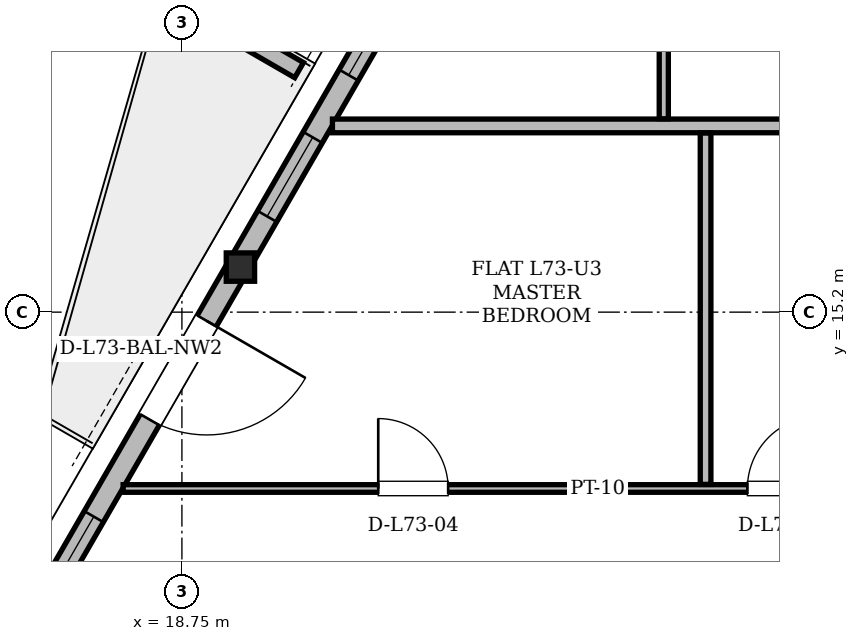
"""IFC4 building model, lengths in metres.
Left out: names, types, materials, properties, quantities, classifications, styles, units other than length and angle.
Written with IfcOpenShell. Run it as: python <this file> out.ifc"""

import sys

from ifc_helpers import new_model, si_unit, direction, frame, frame_2d, origin, origin_2d, place, context, subcontext, project, spatial, polyline, rectangle, i_section, outline, extrude, element, fill, save


model = new_model("IFC4")
c1 = context("Model", 3, precision=1e-05, world=origin(), true_north=direction((0.0, 1.0)))
c2 = subcontext(c1, "Body", "Model", "MODEL_VIEW")
j1 = project(units=[si_unit("LENGTHUNIT", "METRE"), si_unit("PLANEANGLEUNIT", "RADIAN")], contexts=[c1])
p1 = place(None, origin())
s1 = spatial("IfcSite", under=j1, at=p1, CompositionType="ELEMENT")
p2 = place(p1, origin())
s2 = spatial("IfcBuilding", under=s1, at=p2, CompositionType="ELEMENT")
p3 = place(p2, frame((0.0, 0.0, 277.2)))
s3 = spatial("IfcBuildingStorey", under=s2, at=p3, CompositionType="ELEMENT", Elevation=277.2)
p4 = place(p3, frame((19.499, 15.814, 0.005), z_axis=(0.01097941287, -0.01097941287, 0.999879445226), x_axis=(0.707106781187, 0.707106781187, 0.0)))
e1 = element("IfcColumn", 1, at=p4, inside=s3, PredefinedType="COLUMN", context=c2, shape_type="SweptSolid", body=[
    extrude(i_section(OverallWidth=0.373, OverallDepth=0.373, WebThickness=0.016, FlangeThickness=0.026, at=origin_2d()), origin(), (0.0, 0.0, 1.0), 3.891),
])
p5 = place(p3, frame((35.202, 43.013, 0.0), z_axis=(0.0, 0.0, 1.0), x_axis=(-0.499998095684, -0.866026503239, 0.0)))
e2 = element("IfcWall", 2, at=p5, inside=s3, PredefinedType="SOLIDWALL", context=c2, shape_type="SweptSolid", body=[
    extrude(rectangle(XDim=37.389, YDim=0.29, at=frame_2d((18.695, 0.0))), origin(), (0.0, 0.0, 1.0), 3.058),
])
p6 = place(p5, frame((8.034, 0.0, 0.0)))
e3 = element("IfcOpeningElement", 3, at=p6, cuts=e2, PredefinedType="OPENING", context=c2, shape_type="SweptSolid", body=[
    extrude(rectangle(XDim=1.5, YDim=2.2, at=frame_2d((0.75, 1.1))), frame((0.0, 0.145, 0.0), z_axis=(0.0, -1.0, 0.0), x_axis=(1.0, 0.0, 0.0)), (0.0, 0.0, 1.0), 0.29),
])
p7 = place(p5, frame((32.25, 0.0, 0.0)))
e4 = element("IfcOpeningElement", 4, at=p7, cuts=e2, PredefinedType="OPENING", context=c2, shape_type="SweptSolid", body=[
    extrude(rectangle(XDim=1.5, YDim=2.2, at=frame_2d((0.75, 1.1))), frame((0.0, 0.145, 0.0), z_axis=(0.0, -1.0, 0.0), x_axis=(1.0, 0.0, 0.0)), (0.0, 0.0, 1.0), 0.29),
])
p8 = place(p5, frame((35.223, 0.0, 0.85)))
e5 = element("IfcOpeningElement", 5, at=p8, cuts=e2, PredefinedType="OPENING", context=c2, shape_type="SweptSolid", body=[
    extrude(rectangle(XDim=1.2, YDim=1.48, at=frame_2d((0.6, 0.74))), frame((0.0, 0.145, 0.0), z_axis=(0.0, -1.0, 0.0), x_axis=(1.0, 0.0, 0.0)), (0.0, 0.0, 1.0), 0.29),
])
p9 = place(p5, frame((29.461, 0.0, 0.85)))
e6 = element("IfcOpeningElement", 6, at=p9, cuts=e2, PredefinedType="OPENING", context=c2, shape_type="SweptSolid", body=[
    extrude(rectangle(XDim=1.2, YDim=1.48, at=frame_2d((0.6, 0.74))), frame((0.0, 0.145, 0.0), z_axis=(0.0, -1.0, 0.0), x_axis=(1.0, 0.0, 0.0)), (0.0, 0.0, 1.0), 0.29),
])
p10 = place(p5, frame((20.271, 0.0, 0.85)))
e7 = element("IfcOpeningElement", 7, at=p10, cuts=e2, PredefinedType="OPENING", context=c2, shape_type="SweptSolid", body=[
    extrude(rectangle(XDim=1.2, YDim=1.48, at=frame_2d((0.6, 0.74))), frame((0.0, 0.145, 0.0), z_axis=(0.0, -1.0, 0.0), x_axis=(1.0, 0.0, 0.0)), (0.0, 0.0, 1.0), 0.29),
])
p11 = place(p5, frame((22.555, 0.0, 0.85)))
e8 = element("IfcOpeningElement", 8, at=p11, cuts=e2, PredefinedType="OPENING", context=c2, shape_type="SweptSolid", body=[
    extrude(rectangle(XDim=1.2, YDim=1.48, at=frame_2d((0.6, 0.74))), frame((0.0, 0.145, 0.0), z_axis=(0.0, -1.0, 0.0), x_axis=(1.0, 0.0, 0.0)), (0.0, 0.0, 1.0), 0.29),
])
p12 = place(p5, frame((27.315, 0.0, 0.85)))
e9 = element("IfcOpeningElement", 9, at=p12, cuts=e2, PredefinedType="OPENING", context=c2, shape_type="SweptSolid", body=[
    extrude(rectangle(XDim=1.2, YDim=1.48, at=frame_2d((0.6, 0.74))), frame((0.0, 0.145, 0.0), z_axis=(0.0, -1.0, 0.0), x_axis=(1.0, 0.0, 0.0)), (0.0, 0.0, 1.0), 0.29),
])
p13 = place(p5, frame((3.242, 0.0, 0.85)))
e10 = element("IfcOpeningElement", 10, at=p13, cuts=e2, PredefinedType="OPENING", context=c2, shape_type="SweptSolid", body=[
    extrude(rectangle(XDim=1.2, YDim=1.48, at=frame_2d((0.6, 0.74))), frame((0.0, 0.145, 0.0), z_axis=(0.0, -1.0, 0.0), x_axis=(1.0, 0.0, 0.0)), (0.0, 0.0, 1.0), 0.29),
])
p14 = place(p3, frame((20.292, 18.384, 0.0), z_axis=(0.0, 0.0, 1.0), x_axis=(-0.866042246008, 0.499970827278, 0.0)))
e11 = element("IfcWall", 11, at=p14, inside=s3, PredefinedType="PARAPET", context=c2, shape_type="SweptSolid", body=[
    extrude(outline(polyline([(0.0, 0.0), (2.042, 0.0), (2.042, 1.1), (0.0, 1.32), (0.0, 0.0)])), frame((0.0, 0.115, 0.0), z_axis=(0.0, -1.0, 0.0), x_axis=(1.0, 0.0, 0.0)), (0.0, 0.0, 1.0), 0.23),
])
p15 = place(p3, frame((17.977, 12.88, 0.0), z_axis=(0.0, 0.0, 1.0), x_axis=(1.0, 0.0, 0.0)))
e12 = element("IfcWall", 12, at=p15, inside=s3, PredefinedType="PARTITIONING", context=c2, shape_type="SweptSolid", body=[
    extrude(rectangle(XDim=11.609, YDim=0.1, at=frame_2d((5.805, 0.0))), origin(), (0.0, 0.0, 1.0), 2.82),
])
p16 = place(p15, frame((3.357, 0.0, 0.0)))
e13 = element("IfcOpeningElement", 13, at=p16, cuts=e12, PredefinedType="OPENING", context=c2, shape_type="SweptSolid", body=[
    extrude(rectangle(XDim=0.92, YDim=2.12, at=frame_2d((0.46, 1.06))), frame((0.0, 0.05, 0.0), z_axis=(0.0, -1.0, 0.0), x_axis=(1.0, 0.0, 0.0)), (0.0, 0.0, 1.0), 0.1),
])
p17 = place(p15, frame((8.213, 0.0, 0.0)))
e14 = element("IfcOpeningElement", 14, at=p17, cuts=e12, PredefinedType="OPENING", context=c2, shape_type="SweptSolid", body=[
    extrude(rectangle(XDim=0.95, YDim=2.1, at=frame_2d((0.475, 1.05))), frame((0.0, 0.05, 0.0), z_axis=(0.0, -1.0, 0.0), x_axis=(1.0, 0.0, 0.0)), (0.0, 0.0, 1.0), 0.1),
])
p18 = place(p15, frame((10.233, 0.0, 0.0)))
e15 = element("IfcOpeningElement", 15, at=p18, cuts=e12, PredefinedType="OPENING", context=c2, shape_type="SweptSolid", body=[
    extrude(rectangle(XDim=0.88, YDim=2.08, at=frame_2d((0.44, 1.04))), frame((0.0, 0.05, 0.0), z_axis=(0.0, -1.0, 0.0), x_axis=(1.0, 0.0, 0.0)), (0.0, 0.0, 1.0), 0.1),
])
p19 = place(p3, frame((20.73, 17.65, 0.0), z_axis=(0.0, 0.0, 1.0), x_axis=(1.0, 0.0, 0.0)))
e16 = element("IfcWall", 16, at=p19, inside=s3, PredefinedType="PARTITIONING", context=c2, shape_type="SweptSolid", body=[
    extrude(rectangle(XDim=8.855, YDim=0.18, at=frame_2d((4.428, 0.0))), origin(), (0.0, 0.0, 1.0), 2.82),
])
p20 = place(p3, frame((25.09, 17.744, 0.0), z_axis=(0.0, 0.0, 1.0), x_axis=(0.0, 1.0, 0.0)))
e17 = element("IfcWall", 17, at=p20, inside=s3, PredefinedType="PARTITIONING", context=c2, shape_type="SweptSolid", body=[
    extrude(rectangle(XDim=4.102, YDim=0.12, at=frame_2d((2.051, 0.0))), origin(), (0.0, 0.0, 1.0), 3.68),
])
p21 = place(p3, frame((25.64, 12.934, 0.0), z_axis=(0.0, 0.0, 1.0), x_axis=(0.0, 1.0, 0.0)))
e18 = element("IfcWall", 18, at=p21, inside=s3, PredefinedType="PARTITIONING", context=c2, shape_type="SweptSolid", body=[
    extrude(rectangle(XDim=4.622, YDim=0.14, at=frame_2d((2.311, 0.0))), origin(), (0.0, 0.0, 1.0), 3.68),
])
p22 = place(p7, origin())
e19 = element("IfcDoor", 19, at=p22, inside=s3, OperationType="SINGLE_SWING_LEFT", PredefinedType="DOOR", context=c2, shape_type="SweptSolid", body=[
    extrude(rectangle(XDim=1.5, YDim=2.2, at=frame_2d((0.75, 1.1))), frame((0.0, 0.025, 0.0), z_axis=(0.0, -1.0, 0.0), x_axis=(1.0, 0.0, 0.0)), (0.0, 0.0, 1.0), 0.05),
])
fill(e4, e19)
p23 = place(p8, origin())
e20 = element("IfcWindow", 20, at=p23, inside=s3, PartitioningType="SINGLE_PANEL", PredefinedType="WINDOW", context=c2, shape_type="SweptSolid", body=[
    extrude(rectangle(XDim=1.2, YDim=1.48, at=frame_2d((0.6, 0.74))), frame((0.0, 0.03, 0.0), z_axis=(0.0, -1.0, 0.0), x_axis=(1.0, 0.0, 0.0)), (0.0, 0.0, 1.0), 0.06),
])
fill(e5, e20)
p24 = place(p9, origin())
e21 = element("IfcWindow", 21, at=p24, inside=s3, PartitioningType="SINGLE_PANEL", PredefinedType="WINDOW", context=c2, shape_type="SweptSolid", body=[
    extrude(rectangle(XDim=1.2, YDim=1.48, at=frame_2d((0.6, 0.74))), frame((0.0, 0.03, 0.0), z_axis=(0.0, -1.0, 0.0), x_axis=(1.0, 0.0, 0.0)), (0.0, 0.0, 1.0), 0.06),
])
fill(e6, e21)
p25 = place(p12, origin())
e22 = element("IfcWindow", 22, at=p25, inside=s3, PartitioningType="SINGLE_PANEL", PredefinedType="WINDOW", context=c2, shape_type="SweptSolid", body=[
    extrude(rectangle(XDim=1.2, YDim=1.48, at=frame_2d((0.6, 0.74))), frame((0.0, 0.03, 0.0), z_axis=(0.0, -1.0, 0.0), x_axis=(1.0, 0.0, 0.0)), (0.0, 0.0, 1.0), 0.06),
])
fill(e9, e22)
p26 = place(p16, origin())
e23 = element("IfcDoor", 23, at=p26, inside=s3, OperationType="SINGLE_SWING_LEFT", PredefinedType="DOOR", context=c2, shape_type="SweptSolid", body=[
    extrude(rectangle(XDim=0.92, YDim=2.12, at=frame_2d((0.46, 1.06))), frame((0.0, 0.025, 0.0), z_axis=(0.0, -1.0, 0.0), x_axis=(1.0, 0.0, 0.0)), (0.0, 0.0, 1.0), 0.05),
])
fill(e13, e23)
p27 = place(p17, origin())
e24 = element("IfcDoor", 24, at=p27, inside=s3, OperationType="SINGLE_SWING_RIGHT", PredefinedType="DOOR", context=c2, shape_type="SweptSolid", body=[
    extrude(rectangle(XDim=0.95, YDim=2.1, at=frame_2d((0.475, 1.05))), frame((0.0, 0.025, 0.0), z_axis=(0.0, -1.0, 0.0), x_axis=(1.0, 0.0, 0.0)), (0.0, 0.0, 1.0), 0.05),
])
fill(e14, e24)
save(model, sys.argv[1])
